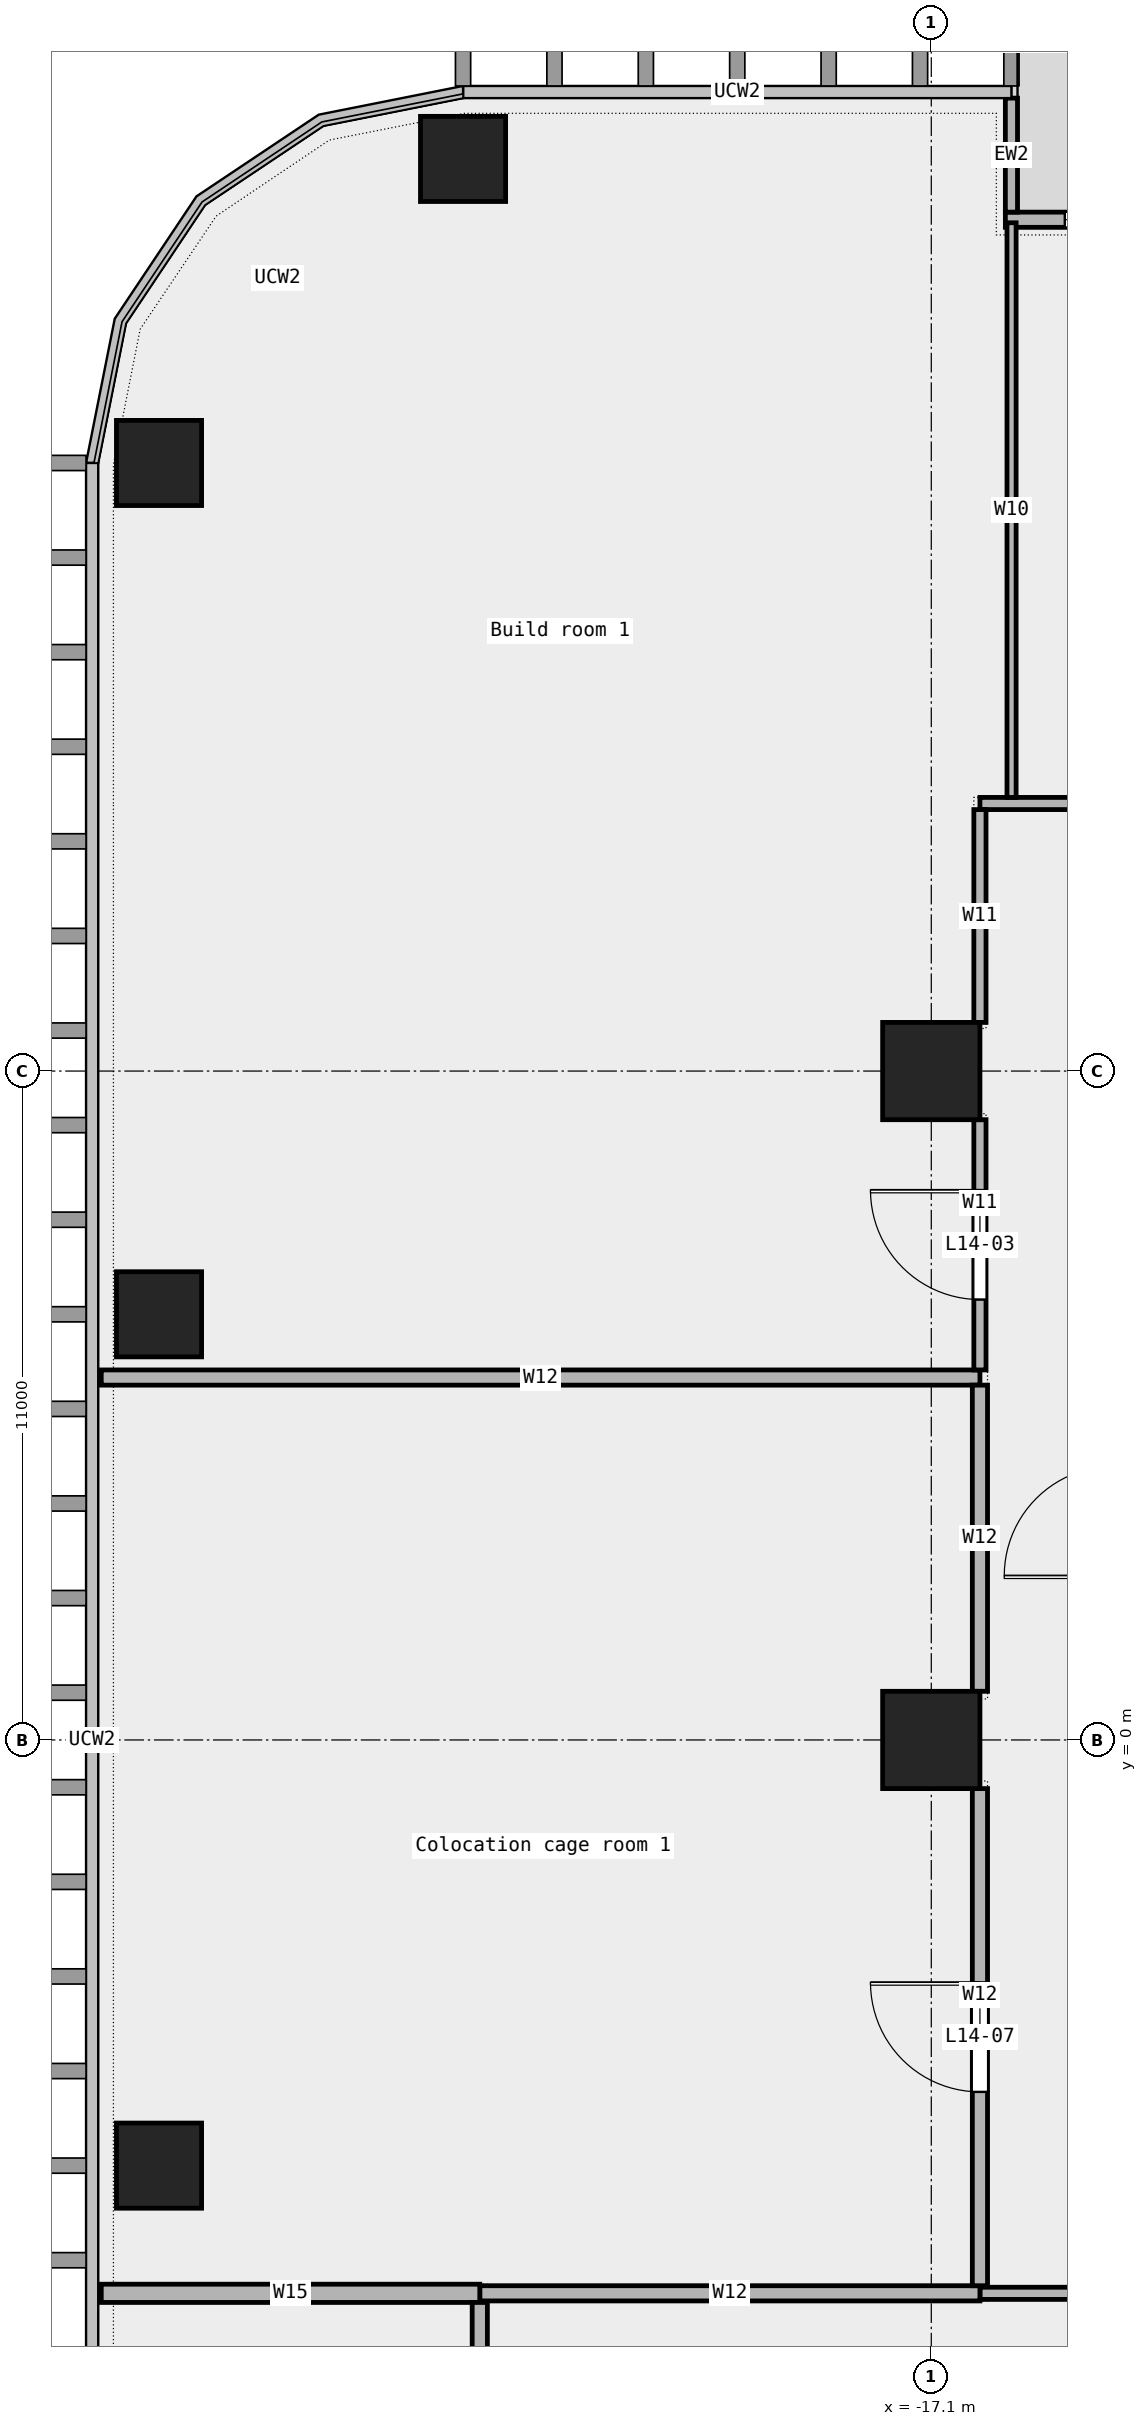
"""IFC4 building model, lengths in metres.
Left out: names, types, materials, properties, quantities, classifications, styles, units other than length and angle.
Written with IfcOpenShell. Run it as: python <this file> out.ifc"""

import sys

from ifc_helpers import new_model, si_unit, direction, frame, frame_2d, origin, origin_2d, place, context, subcontext, project, spatial, rectangle, extrude, element, fill, save


model = new_model("IFC4")
c1 = context("Model", 3, precision=1e-05, world=origin(), true_north=direction((0.0, 1.0)))
c2 = subcontext(c1, "Body", "Model", "MODEL_VIEW")
j1 = project(units=[si_unit("LENGTHUNIT", "METRE"), si_unit("PLANEANGLEUNIT", "RADIAN")], contexts=[c1])
p1 = place(None, origin())
s1 = spatial("IfcSite", under=j1, at=p1, CompositionType="ELEMENT")
p2 = place(p1, origin())
s2 = spatial("IfcBuilding", under=s1, at=p2, CompositionType="ELEMENT")
p3 = place(p2, frame((0.0, 0.0, 74.2)))
s3 = spatial("IfcBuildingStorey", under=s2, at=p3, CompositionType="ELEMENT", Elevation=74.2)
for number, where, z_axis, x_axis in (
    (1, (-24.8, 26.0, 0.0), (0.0, 0.0, 1.0), (1.0, 0.0, 0.0)),
    (2, (-29.8, 21.0, 0.0), (0.0, 0.0, 1.0), (1.0, 0.0, 0.0)),
    (3, (-29.8, 7.0, 0.0), (0.0, 0.0, 1.0), (1.0, 0.0, 0.0)),
    (4, (-29.8, -7.0, 0.0), (0.0, 0.0, 1.0), (1.0, 0.0, 0.0)),
):
    element("IfcColumn", number, at=place(p3, frame(where, z_axis=z_axis, x_axis=x_axis)), inside=s3, PredefinedType="COLUMN", context=c2, shape_type="SweptSolid", body=[
        extrude(rectangle(XDim=1.4, YDim=1.4, at=origin_2d()), origin(), (0.0, 0.0, 1.0), 4.35),
    ])
for number, where, z_axis, x_axis in (
    (5, (-17.1, 0.0, 0.0), (0.0, 0.0, 1.0), (1.0, 0.0, 0.0)),
    (6, (-17.1, 11.0, 0.0), (0.0, 0.0, 1.0), (1.0, 0.0, 0.0)),
):
    element("IfcColumn", number, at=place(p3, frame(where, z_axis=z_axis, x_axis=x_axis)), inside=s3, PredefinedType="COLUMN", context=c2, shape_type="SweptSolid", body=[
        extrude(rectangle(XDim=1.6, YDim=1.6, at=origin_2d()), origin(), (0.0, 0.0, 1.0), 4.35),
    ])
p4 = place(p3, frame((-2.155, 25.0, 0.0), z_axis=(0.0, 0.0, 1.0), x_axis=(-1.0, 0.0, 0.0)))
e7 = element("IfcWall", 7, at=p4, inside=s3, PredefinedType="STANDARD", context=c2, shape_type="SweptSolid", body=[
    extrude(rectangle(XDim=13.727, YDim=0.25, at=frame_2d((6.864, 0.0))), origin(), (0.0, 0.0, 1.0), 4.35),
])
p5 = place(p4, frame((1.75, 0.0, 0.45)))
e8 = element("IfcOpeningElement", 8, at=p5, cuts=e7, PredefinedType="OPENING", context=c2, shape_type="SweptSolid", body=[
    extrude(rectangle(XDim=1.5, YDim=3.0, at=frame_2d((0.75, 1.5))), frame((0.0, 0.137, 0.0), z_axis=(0.0, -1.0, 0.0), x_axis=(1.0, 0.0, 0.0)), (0.0, 0.0, 1.0), 0.274),
])
p6 = place(p4, frame((6.0, 0.0, 0.0)))
e9 = element("IfcOpeningElement", 9, at=p6, cuts=e7, PredefinedType="OPENING", context=c2, shape_type="SweptSolid", body=[
    extrude(rectangle(XDim=1.8, YDim=2.4, at=frame_2d((0.9, 1.2))), frame((0.0, 0.137, 0.0), z_axis=(0.0, -1.0, 0.0), x_axis=(1.0, 0.0, 0.0)), (0.0, 0.0, 1.0), 0.274),
])
p7 = place(p4, frame((11.25, 0.0, 0.45)))
e10 = element("IfcOpeningElement", 10, at=p7, cuts=e7, PredefinedType="OPENING", context=c2, shape_type="SweptSolid", body=[
    extrude(rectangle(XDim=1.5, YDim=3.0, at=frame_2d((0.75, 1.5))), frame((0.0, 0.137, 0.0), z_axis=(0.0, -1.0, 0.0), x_axis=(1.0, 0.0, 0.0)), (0.0, 0.0, 1.0), 0.274),
])
p8 = place(p3, frame((-15.782, 27.0, 0.0), z_axis=(0.0, 0.0, 1.0), x_axis=(0.0, -1.0, 0.0)))
e11 = element("IfcWall", 11, at=p8, inside=s3, PredefinedType="STANDARD", context=c2, shape_type="SweptSolid", body=[
    extrude(rectangle(XDim=1.875, YDim=0.2, at=frame_2d((0.938, 0.0))), origin(), (0.0, 0.0, 1.0), 4.35),
])
p9 = place(p3, frame((-16.3, -9.1, 0.0), z_axis=(0.0, 0.0, 1.0), x_axis=(1.0, 0.0, 0.0)))
e12 = element("IfcWall", 12, at=p9, inside=s3, PredefinedType="PARTITIONING", context=c2, shape_type="SweptSolid", body=[
    extrude(rectangle(XDim=6.845, YDim=0.2, at=frame_2d((3.422, 0.0))), origin(), (0.0, 0.0, 1.0), 4.35),
])
p10 = place(p3, frame((-24.525, -9.1, 0.0), z_axis=(0.0, 0.0, 1.0), x_axis=(1.0, 0.0, 0.0)))
e13 = element("IfcWall", 13, at=p10, inside=s3, PredefinedType="PARTITIONING", context=c2, shape_type="SweptSolid", body=[
    extrude(rectangle(XDim=8.225, YDim=0.25, at=frame_2d((4.112, 0.0))), origin(), (0.0, 0.0, 1.0), 4.35),
])
p11 = place(p3, frame((-30.75, -9.1, 0.0), z_axis=(0.0, 0.0, 1.0), x_axis=(1.0, 0.0, 0.0)))
e14 = element("IfcWall", 14, at=p11, inside=s3, PredefinedType="PARTITIONING", context=c2, shape_type="SweptSolid", body=[
    extrude(rectangle(XDim=6.225, YDim=0.3, at=frame_2d((3.113, 0.0))), origin(), (0.0, 0.0, 1.0), 4.35),
])
p12 = place(p3, frame((-30.75, 5.96, 0.0), z_axis=(0.0, 0.0, 1.0), x_axis=(1.0, 0.0, 0.0)))
e15 = element("IfcWall", 15, at=p12, inside=s3, PredefinedType="PARTITIONING", context=c2, shape_type="SweptSolid", body=[
    extrude(rectangle(XDim=14.45, YDim=0.25, at=frame_2d((7.225, 0.0))), origin(), (0.0, 0.0, 1.0), 4.35),
])
p13 = place(p3, frame((-16.3, 15.4, 0.0), z_axis=(0.0, 0.0, 1.0), x_axis=(1.0, 0.0, 0.0)))
e16 = element("IfcWall", 16, at=p13, inside=s3, PredefinedType="PARTITIONING", context=c2, shape_type="SweptSolid", body=[
    extrude(rectangle(XDim=14.045, YDim=0.2, at=frame_2d((7.022, 0.0))), origin(), (0.0, 0.0, 1.0), 4.35),
])
p14 = place(p13, frame((6.532, 0.0, 0.0)))
e17 = element("IfcOpeningElement", 17, at=p14, cuts=e16, PredefinedType="OPENING", context=c2, shape_type="SweptSolid", body=[
    extrude(rectangle(XDim=1.5, YDim=2.1, at=frame_2d((0.75, 1.05))), frame((0.0, 0.112, 0.0), z_axis=(0.0, -1.0, 0.0), x_axis=(1.0, 0.0, 0.0)), (0.0, 0.0, 1.0), 0.224),
])
p15 = place(p3, frame((-24.525, -15.325, 0.0), z_axis=(0.0, 0.0, 1.0), x_axis=(0.0, 1.0, 0.0)))
e18 = element("IfcWall", 18, at=p15, inside=s3, PredefinedType="PARTITIONING", context=c2, shape_type="SweptSolid", body=[
    extrude(rectangle(XDim=6.075, YDim=0.25, at=frame_2d((3.038, 0.0))), origin(), (0.0, 0.0, 1.0), 4.35),
])
p16 = place(p3, frame((-16.3, 6.085, 0.0), z_axis=(0.0, 0.0, 1.0), x_axis=(0.0, 1.0, 0.0)))
e19 = element("IfcWall", 19, at=p16, inside=s3, PredefinedType="PARTITIONING", context=c2, shape_type="SweptSolid", body=[
    extrude(rectangle(XDim=4.115, YDim=0.2, at=frame_2d((2.058, 0.0))), origin(), (0.0, 0.0, 1.0), 4.35),
])
p17 = place(p16, frame((1.157, 0.0, 0.0)))
e20 = element("IfcOpeningElement", 20, at=p17, cuts=e19, PredefinedType="OPENING", context=c2, shape_type="SweptSolid", body=[
    extrude(rectangle(XDim=1.8, YDim=2.1, at=frame_2d((0.9, 1.05))), frame((0.0, 0.112, 0.0), z_axis=(0.0, -1.0, 0.0), x_axis=(1.0, 0.0, 0.0)), (0.0, 0.0, 1.0), 0.224),
])
p18 = place(p3, frame((-16.3, 11.8, 0.0), z_axis=(0.0, 0.0, 1.0), x_axis=(0.0, 1.0, 0.0)))
e21 = element("IfcWall", 21, at=p18, inside=s3, PredefinedType="PARTITIONING", context=c2, shape_type="SweptSolid", body=[
    extrude(rectangle(XDim=3.5, YDim=0.2, at=frame_2d((1.75, 0.0))), origin(), (0.0, 0.0, 1.0), 4.35),
])
p19 = place(p3, frame((-16.3, -8.975, 0.0), z_axis=(0.0, 0.0, 1.0), x_axis=(0.0, 1.0, 0.0)))
e22 = element("IfcWall", 22, at=p19, inside=s3, PredefinedType="PARTITIONING", context=c2, shape_type="SweptSolid", body=[
    extrude(rectangle(XDim=8.175, YDim=0.25, at=frame_2d((4.087, 0.0))), origin(), (0.0, 0.0, 1.0), 4.35),
])
p20 = place(p19, frame((3.188, 0.0, 0.0)))
e23 = element("IfcOpeningElement", 23, at=p20, cuts=e22, PredefinedType="OPENING", context=c2, shape_type="SweptSolid", body=[
    extrude(rectangle(XDim=1.8, YDim=2.1, at=frame_2d((0.9, 1.05))), frame((0.0, 0.137, 0.0), z_axis=(0.0, -1.0, 0.0), x_axis=(1.0, 0.0, 0.0)), (0.0, 0.0, 1.0), 0.274),
])
p21 = place(p3, frame((-16.3, 0.8, 0.0), z_axis=(0.0, 0.0, 1.0), x_axis=(0.0, 1.0, 0.0)))
e24 = element("IfcWall", 24, at=p21, inside=s3, PredefinedType="PARTITIONING", context=c2, shape_type="SweptSolid", body=[
    extrude(rectangle(XDim=5.035, YDim=0.25, at=frame_2d((2.518, 0.0))), origin(), (0.0, 0.0, 1.0), 4.35),
])
p22 = place(p3, frame((-15.78, 15.5, 0.0), z_axis=(0.0, 0.0, 1.0), x_axis=(0.0, 1.0, 0.0)))
e25 = element("IfcWall", 25, at=p22, inside=s3, PredefinedType="PARTITIONING", context=c2, shape_type="SweptSolid", body=[
    extrude(rectangle(XDim=9.45, YDim=0.15, at=frame_2d((4.725, 0.0))), origin(), (0.0, 0.0, 1.0), 4.35),
])
p23 = place(p7, origin())
e26 = element("IfcWindow", 26, at=p23, inside=s3, PartitioningType="SINGLE_PANEL", PredefinedType="WINDOW", context=c2, shape_type="SweptSolid", body=[
    extrude(rectangle(XDim=1.5, YDim=3.0, at=frame_2d((0.75, 1.5))), frame((0.0, 0.03, 0.0), z_axis=(0.0, -1.0, 0.0), x_axis=(1.0, 0.0, 0.0)), (0.0, 0.0, 1.0), 0.06),
])
fill(e10, e26)
p24 = place(p17, origin())
e27 = element("IfcDoor", 27, at=p24, inside=s3, OperationType="DOUBLE_DOOR_SINGLE_SWING", PredefinedType="DOOR", context=c2, shape_type="SweptSolid", body=[
    extrude(rectangle(XDim=1.8, YDim=2.1, at=frame_2d((0.9, 1.05))), frame((0.0, 0.025, 0.0), z_axis=(0.0, -1.0, 0.0), x_axis=(1.0, 0.0, 0.0)), (0.0, 0.0, 1.0), 0.05),
])
fill(e20, e27)
p25 = place(p20, origin())
e28 = element("IfcDoor", 28, at=p25, inside=s3, OperationType="DOUBLE_DOOR_SINGLE_SWING", PredefinedType="DOOR", context=c2, shape_type="SweptSolid", body=[
    extrude(rectangle(XDim=1.8, YDim=2.1, at=frame_2d((0.9, 1.05))), frame((0.0, 0.025, 0.0), z_axis=(0.0, -1.0, 0.0), x_axis=(1.0, 0.0, 0.0)), (0.0, 0.0, 1.0), 0.05),
])
fill(e23, e28)
save(model, sys.argv[1])
